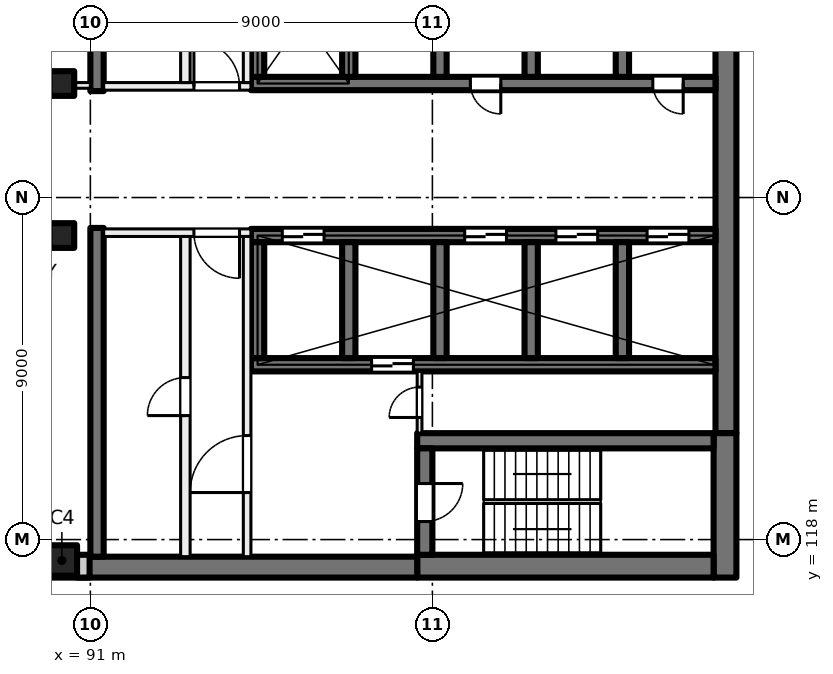
"""IFC4 building model, lengths in metres.
Left out: names, types, materials, properties, quantities, classifications, styles, units other than length and angle.
Written with IfcOpenShell. Run it as: python <this file> out.ifc"""

import sys

from ifc_helpers import new_model, si_unit, direction, frame, frame_2d, origin, origin_2d, place, context, subcontext, project, spatial, rectangle, extrude, element, fill, save


model = new_model("IFC4")
c1 = context("Model", 3, precision=1e-05, world=origin(), true_north=direction((0.0, 1.0)))
c2 = subcontext(c1, "Body", "Model", "MODEL_VIEW")
j1 = project(units=[si_unit("LENGTHUNIT", "METRE"), si_unit("PLANEANGLEUNIT", "RADIAN")], contexts=[c1])
p1 = place(None, origin())
s1 = spatial("IfcSite", under=j1, at=p1, CompositionType="ELEMENT")
p2 = place(p1, origin())
s2 = spatial("IfcBuilding", under=s1, at=p2, CompositionType="ELEMENT")
p3 = place(p2, frame((0.0, 0.0, 134.5)))
s3 = spatial("IfcBuildingStorey", under=s2, at=p3, CompositionType="ELEMENT", Elevation=134.5)
for number, where, z_axis, x_axis in (
    (1, (90.25, 130.0, 0.0), (0.0, 0.0, 1.0), (1.0, 0.0, 0.0)),
    (2, (90.25, 126.0, 0.0), (0.0, 0.0, 1.0), (1.0, 0.0, 0.0)),
):
    element("IfcColumn", number, at=place(p3, frame(where, z_axis=z_axis, x_axis=x_axis)), inside=s3, PredefinedType="COLUMN", context=c2, shape_type="SweptSolid", body=[
        extrude(rectangle(XDim=0.65, YDim=0.65, at=origin_2d()), origin(), (0.0, 0.0, 1.0), 4.0),
    ])
p4 = place(p3, frame((90.25, 117.45, 0.0), z_axis=(0.0, 0.0, 1.0), x_axis=(1.0, 0.0, 0.0)))
e3 = element("IfcColumn", 3, at=p4, inside=s3, PredefinedType="COLUMN", context=c2, shape_type="SweptSolid", body=[
    extrude(rectangle(XDim=0.8, YDim=0.8, at=origin_2d()), origin(), (0.0, 0.0, 1.0), 4.0),
])
p5 = place(p3, frame((107.725, 135.2, 0.0), z_axis=(0.0, 0.0, 1.0), x_axis=(0.0, -1.0, 0.0)))
e4 = element("IfcWall", 4, at=p5, inside=s3, PredefinedType="SHEAR", context=c2, shape_type="SweptSolid", body=[
    extrude(rectangle(XDim=14.4, YDim=0.55, at=frame_2d((7.2, 0.0))), origin(), (0.0, 0.0, 1.0), 4.0),
])
p6 = place(p3, frame((107.7, 120.8, 0.0), z_axis=(0.0, 0.0, 1.0), x_axis=(0.0, -1.0, 0.0)))
e5 = element("IfcWall", 5, at=p6, inside=s3, PredefinedType="SHEAR", context=c2, shape_type="SweptSolid", body=[
    extrude(rectangle(XDim=3.8, YDim=0.6, at=frame_2d((1.9, 0.0))), origin(), (0.0, 0.0, 1.0), 4.0),
])
p7 = place(p3, frame((107.4, 117.3, 0.0), z_axis=(0.0, 0.0, 1.0), x_axis=(-1.0, 0.0, 0.0)))
e6 = element("IfcWall", 6, at=p7, inside=s3, PredefinedType="SHEAR", context=c2, shape_type="SweptSolid", body=[
    extrude(rectangle(XDim=7.8, YDim=0.6, at=frame_2d((3.9, 0.0))), origin(), (0.0, 0.0, 1.0), 4.0),
])
p8 = place(p3, frame((99.6, 117.275, 0.0), z_axis=(0.0, 0.0, 1.0), x_axis=(-1.0, 0.0, 0.0)))
e7 = element("IfcWall", 7, at=p8, inside=s3, PredefinedType="SHEAR", context=c2, shape_type="SweptSolid", body=[
    extrude(rectangle(XDim=8.95, YDim=0.55, at=frame_2d((4.475, 0.0))), origin(), (0.0, 0.0, 1.0), 4.0),
])
p9 = place(p3, frame((107.4, 120.6, 0.0), z_axis=(0.0, 0.0, 1.0), x_axis=(-1.0, 0.0, 0.0)))
e8 = element("IfcWall", 8, at=p9, inside=s3, PredefinedType="SHEAR", context=c2, shape_type="SweptSolid", body=[
    extrude(rectangle(XDim=7.8, YDim=0.4, at=frame_2d((3.9, 0.0))), origin(), (0.0, 0.0, 1.0), 4.0),
])
p10 = place(p3, frame((99.8, 120.4, 0.0), z_axis=(0.0, 0.0, 1.0), x_axis=(0.0, -1.0, 0.0)))
e9 = element("IfcWall", 9, at=p10, inside=s3, PredefinedType="SHEAR", context=c2, shape_type="SweptSolid", body=[
    extrude(rectangle(XDim=2.8, YDim=0.4, at=frame_2d((1.4, 0.0))), origin(), (0.0, 0.0, 1.0), 4.0),
])
p11 = place(p10, frame((0.925, 0.0, 0.0)))
e10 = element("IfcOpeningElement", 10, at=p11, cuts=e9, PredefinedType="OPENING", context=c2, shape_type="SweptSolid", body=[
    extrude(rectangle(XDim=1.0, YDim=2.1, at=frame_2d((0.5, 1.05))), frame((0.0, 0.21, 0.0), z_axis=(0.0, -1.0, 0.0), x_axis=(1.0, 0.0, 0.0)), (0.0, 0.0, 1.0), 0.42),
])
p12 = place(p3, frame((107.45, 130.0, 0.0), z_axis=(0.0, 0.0, 1.0), x_axis=(-1.0, 0.0, 0.0)))
e11 = element("IfcWall", 11, at=p12, inside=s3, PredefinedType="SHEAR", context=c2, shape_type="SweptSolid", body=[
    extrude(rectangle(XDim=12.225, YDim=0.35, at=frame_2d((6.112, 0.0))), origin(), (0.0, 0.0, 1.0), 4.0),
])
p13 = place(p12, frame((0.85, 0.0, 0.0)))
e12 = element("IfcOpeningElement", 12, at=p13, cuts=e11, PredefinedType="OPENING", context=c2, shape_type="SweptSolid", body=[
    extrude(rectangle(XDim=0.8, YDim=2.1, at=frame_2d((0.4, 1.05))), frame((0.0, 0.185, 0.0), z_axis=(0.0, -1.0, 0.0), x_axis=(1.0, 0.0, 0.0)), (0.0, 0.0, 1.0), 0.37),
])
p14 = place(p12, frame((5.65, 0.0, 0.0)))
e13 = element("IfcOpeningElement", 13, at=p14, cuts=e11, PredefinedType="OPENING", context=c2, shape_type="SweptSolid", body=[
    extrude(rectangle(XDim=0.8, YDim=2.1, at=frame_2d((0.4, 1.05))), frame((0.0, 0.185, 0.0), z_axis=(0.0, -1.0, 0.0), x_axis=(1.0, 0.0, 0.0)), (0.0, 0.0, 1.0), 0.37),
])
for number, where, z_axis, x_axis in (
    (14, (105.0, 133.225, 0.0), (0.0, 0.0, 1.0), (0.0, -1.0, 0.0)),
    (15, (102.6, 133.225, 0.0), (0.0, 0.0, 1.0), (0.0, -1.0, 0.0)),
    (16, (100.2, 133.225, 0.0), (0.0, 0.0, 1.0), (0.0, -1.0, 0.0)),
    (17, (97.8, 133.225, 0.0), (0.0, 0.0, 1.0), (0.0, -1.0, 0.0)),
    (18, (95.4, 133.225, 0.0), (0.0, 0.0, 1.0), (0.0, -1.0, 0.0)),
):
    element("IfcWall", number, at=place(p3, frame(where, z_axis=z_axis, x_axis=x_axis)), inside=s3, PredefinedType="SHEAR", context=c2, shape_type="SweptSolid", body=[
        extrude(rectangle(XDim=3.05, YDim=0.35, at=frame_2d((1.525, 0.0))), origin(), (0.0, 0.0, 1.0), 4.0),
    ])
p15 = place(p3, frame((107.45, 126.0, 0.0), z_axis=(0.0, 0.0, 1.0), x_axis=(-1.0, 0.0, 0.0)))
e19 = element("IfcWall", 19, at=p15, inside=s3, PredefinedType="SHEAR", context=c2, shape_type="SweptSolid", body=[
    extrude(rectangle(XDim=12.225, YDim=0.35, at=frame_2d((6.112, 0.0))), origin(), (0.0, 0.0, 1.0), 4.0),
])
p16 = place(p15, frame((0.7, 0.0, 0.0)))
e20 = element("IfcOpeningElement", 20, at=p16, cuts=e19, PredefinedType="OPENING", context=c2, shape_type="SweptSolid", body=[
    extrude(rectangle(XDim=1.1, YDim=2.1, at=frame_2d((0.55, 1.05))), frame((0.0, 0.185, 0.0), z_axis=(0.0, -1.0, 0.0), x_axis=(1.0, 0.0, 0.0)), (0.0, 0.0, 1.0), 0.37),
])
p17 = place(p15, frame((3.1, 0.0, 0.0)))
e21 = element("IfcOpeningElement", 21, at=p17, cuts=e19, PredefinedType="OPENING", context=c2, shape_type="SweptSolid", body=[
    extrude(rectangle(XDim=1.1, YDim=2.1, at=frame_2d((0.55, 1.05))), frame((0.0, 0.185, 0.0), z_axis=(0.0, -1.0, 0.0), x_axis=(1.0, 0.0, 0.0)), (0.0, 0.0, 1.0), 0.37),
])
p18 = place(p15, frame((5.5, 0.0, 0.0)))
e22 = element("IfcOpeningElement", 22, at=p18, cuts=e19, PredefinedType="OPENING", context=c2, shape_type="SweptSolid", body=[
    extrude(rectangle(XDim=1.1, YDim=2.1, at=frame_2d((0.55, 1.05))), frame((0.0, 0.185, 0.0), z_axis=(0.0, -1.0, 0.0), x_axis=(1.0, 0.0, 0.0)), (0.0, 0.0, 1.0), 0.37),
])
p19 = place(p15, frame((10.3, 0.0, 0.0)))
e23 = element("IfcOpeningElement", 23, at=p19, cuts=e19, PredefinedType="OPENING", context=c2, shape_type="SweptSolid", body=[
    extrude(rectangle(XDim=1.1, YDim=2.1, at=frame_2d((0.55, 1.05))), frame((0.0, 0.185, 0.0), z_axis=(0.0, -1.0, 0.0), x_axis=(1.0, 0.0, 0.0)), (0.0, 0.0, 1.0), 0.37),
])
p20 = place(p3, frame((107.45, 122.6, 0.0), z_axis=(0.0, 0.0, 1.0), x_axis=(-1.0, 0.0, 0.0)))
e24 = element("IfcWall", 24, at=p20, inside=s3, PredefinedType="SHEAR", context=c2, shape_type="SweptSolid", body=[
    extrude(rectangle(XDim=12.225, YDim=0.35, at=frame_2d((6.112, 0.0))), origin(), (0.0, 0.0, 1.0), 4.0),
])
p21 = place(p20, frame((7.95, 0.0, 0.0)))
e25 = element("IfcOpeningElement", 25, at=p21, cuts=e24, PredefinedType="OPENING", context=c2, shape_type="SweptSolid", body=[
    extrude(rectangle(XDim=1.1, YDim=2.1, at=frame_2d((0.55, 1.05))), frame((0.0, 0.185, 0.0), z_axis=(0.0, -1.0, 0.0), x_axis=(1.0, 0.0, 0.0)), (0.0, 0.0, 1.0), 0.37),
])
for number, where, z_axis, x_axis in (
    (26, (105.0, 125.825, 0.0), (0.0, 0.0, 1.0), (0.0, -1.0, 0.0)),
    (27, (102.6, 125.825, 0.0), (0.0, 0.0, 1.0), (0.0, -1.0, 0.0)),
    (28, (100.2, 125.825, 0.0), (0.0, 0.0, 1.0), (0.0, -1.0, 0.0)),
    (29, (97.8, 125.825, 0.0), (0.0, 0.0, 1.0), (0.0, -1.0, 0.0)),
    (30, (95.4, 125.825, 0.0), (0.0, 0.0, 1.0), (0.0, -1.0, 0.0)),
):
    element("IfcWall", number, at=place(p3, frame(where, z_axis=z_axis, x_axis=x_axis)), inside=s3, PredefinedType="SHEAR", context=c2, shape_type="SweptSolid", body=[
        extrude(rectangle(XDim=3.05, YDim=0.35, at=frame_2d((1.525, 0.0))), origin(), (0.0, 0.0, 1.0), 4.0),
    ])
for number, where, z_axis, x_axis in (
    (31, (91.175, 138.45, 0.0), (0.0, 0.0, 1.0), (0.0, -1.0, 0.0)),
    (32, (91.175, 126.2, 0.0), (0.0, 0.0, 1.0), (0.0, -1.0, 0.0)),
):
    element("IfcWall", number, at=place(p3, frame(where, z_axis=z_axis, x_axis=x_axis)), inside=s3, PredefinedType="SHEAR", context=c2, shape_type="SweptSolid", body=[
        extrude(rectangle(XDim=8.65, YDim=0.35, at=frame_2d((4.325, 0.0))), origin(), (0.0, 0.0, 1.0), 4.0),
    ])
p22 = place(p3, frame((90.98, 117.3, 0.0), z_axis=(0.0, 0.0, 1.0), x_axis=(-1.0, 0.0, 0.0)))
e33 = element("IfcWall", 33, at=p22, inside=s3, PredefinedType="SOLIDWALL", context=c2, shape_type="SweptSolid", body=[
    extrude(rectangle(XDim=33.745, YDim=0.6, at=frame_2d((16.873, 0.0))), origin(), (0.0, 0.0, 1.0), 3.625),
])
p23 = place(p22, frame((1.48, 0.0, 0.9)))
e34 = element("IfcOpeningElement", 34, at=p23, cuts=e33, PredefinedType="OPENING", context=c2, shape_type="SweptSolid", body=[
    extrude(rectangle(XDim=3.0, YDim=2.4, at=frame_2d((1.5, 1.2))), frame((0.0, 0.31, 0.0), z_axis=(0.0, -1.0, 0.0), x_axis=(1.0, 0.0, 0.0)), (0.0, 0.0, 1.0), 0.62),
])
p24 = place(p22, frame((5.98, 0.0, 0.9)))
e35 = element("IfcOpeningElement", 35, at=p24, cuts=e33, PredefinedType="OPENING", context=c2, shape_type="SweptSolid", body=[
    extrude(rectangle(XDim=3.0, YDim=2.4, at=frame_2d((1.5, 1.2))), frame((0.0, 0.31, 0.0), z_axis=(0.0, -1.0, 0.0), x_axis=(1.0, 0.0, 0.0)), (0.0, 0.0, 1.0), 0.62),
])
p25 = place(p22, frame((10.48, 0.0, 0.9)))
e36 = element("IfcOpeningElement", 36, at=p25, cuts=e33, PredefinedType="OPENING", context=c2, shape_type="SweptSolid", body=[
    extrude(rectangle(XDim=3.0, YDim=2.4, at=frame_2d((1.5, 1.2))), frame((0.0, 0.31, 0.0), z_axis=(0.0, -1.0, 0.0), x_axis=(1.0, 0.0, 0.0)), (0.0, 0.0, 1.0), 0.62),
])
p26 = place(p22, frame((14.98, 0.0, 0.9)))
e37 = element("IfcOpeningElement", 37, at=p26, cuts=e33, PredefinedType="OPENING", context=c2, shape_type="SweptSolid", body=[
    extrude(rectangle(XDim=3.0, YDim=2.4, at=frame_2d((1.5, 1.2))), frame((0.0, 0.31, 0.0), z_axis=(0.0, -1.0, 0.0), x_axis=(1.0, 0.0, 0.0)), (0.0, 0.0, 1.0), 0.62),
])
p27 = place(p22, frame((19.48, 0.0, 0.9)))
e38 = element("IfcOpeningElement", 38, at=p27, cuts=e33, PredefinedType="OPENING", context=c2, shape_type="SweptSolid", body=[
    extrude(rectangle(XDim=3.0, YDim=2.4, at=frame_2d((1.5, 1.2))), frame((0.0, 0.31, 0.0), z_axis=(0.0, -1.0, 0.0), x_axis=(1.0, 0.0, 0.0)), (0.0, 0.0, 1.0), 0.62),
])
p28 = place(p22, frame((23.98, 0.0, 0.9)))
e39 = element("IfcOpeningElement", 39, at=p28, cuts=e33, PredefinedType="OPENING", context=c2, shape_type="SweptSolid", body=[
    extrude(rectangle(XDim=3.0, YDim=2.4, at=frame_2d((1.5, 1.2))), frame((0.0, 0.31, 0.0), z_axis=(0.0, -1.0, 0.0), x_axis=(1.0, 0.0, 0.0)), (0.0, 0.0, 1.0), 0.62),
])
p29 = place(p22, frame((28.48, 0.0, 0.9)))
e40 = element("IfcOpeningElement", 40, at=p29, cuts=e33, PredefinedType="OPENING", context=c2, shape_type="SweptSolid", body=[
    extrude(rectangle(XDim=3.0, YDim=2.4, at=frame_2d((1.5, 1.2))), frame((0.0, 0.31, 0.0), z_axis=(0.0, -1.0, 0.0), x_axis=(1.0, 0.0, 0.0)), (0.0, 0.0, 1.0), 0.62),
])
p30 = place(p3, frame((95.225, 126.075, 0.0), z_axis=(0.0, 0.0, 1.0), x_axis=(-1.0, 0.0, 0.0)))
e41 = element("IfcWall", 41, at=p30, inside=s3, PredefinedType="PARTITIONING", context=c2, shape_type="SweptSolid", body=[
    extrude(rectangle(XDim=3.875, YDim=0.2, at=frame_2d((1.938, 0.0))), origin(), (0.0, 0.0, 1.0), 3.625),
])
p31 = place(p30, frame((0.3, 0.0, 0.0)))
e42 = element("IfcOpeningElement", 42, at=p31, cuts=e41, PredefinedType="OPENING", context=c2, shape_type="SweptSolid", body=[
    extrude(rectangle(XDim=1.2, YDim=2.1, at=frame_2d((0.6, 1.05))), frame((0.0, 0.11, 0.0), z_axis=(0.0, -1.0, 0.0), x_axis=(1.0, 0.0, 0.0)), (0.0, 0.0, 1.0), 0.22),
])
p32 = place(p3, frame((95.125, 117.55, 0.0), z_axis=(0.0, 0.0, 1.0), x_axis=(0.0, 1.0, 0.0)))
e43 = element("IfcWall", 43, at=p32, inside=s3, PredefinedType="PARTITIONING", context=c2, shape_type="SweptSolid", body=[
    extrude(rectangle(XDim=8.425, YDim=0.2, at=frame_2d((4.212, 0.0))), origin(), (0.0, 0.0, 1.0), 3.625),
])
p33 = place(p32, frame((1.688, 0.0, 0.0)))
e44 = element("IfcOpeningElement", 44, at=p33, cuts=e43, PredefinedType="OPENING", context=c2, shape_type="SweptSolid", body=[
    extrude(rectangle(XDim=1.5, YDim=2.1, at=frame_2d((0.75, 1.05))), frame((0.0, 0.11, 0.0), z_axis=(0.0, -1.0, 0.0), x_axis=(1.0, 0.0, 0.0)), (0.0, 0.0, 1.0), 0.22),
])
p34 = place(p3, frame((93.5, 117.55, 0.0), z_axis=(0.0, 0.0, 1.0), x_axis=(0.0, 1.0, 0.0)))
e45 = element("IfcWall", 45, at=p34, inside=s3, PredefinedType="PARTITIONING", context=c2, shape_type="SweptSolid", body=[
    extrude(rectangle(XDim=8.425, YDim=0.25, at=frame_2d((4.212, 0.0))), origin(), (0.0, 0.0, 1.0), 3.625),
])
p35 = place(p34, frame((3.712, 0.0, 0.0)))
e46 = element("IfcOpeningElement", 46, at=p35, cuts=e45, PredefinedType="OPENING", context=c2, shape_type="SweptSolid", body=[
    extrude(rectangle(XDim=1.0, YDim=2.1, at=frame_2d((0.5, 1.05))), frame((0.0, 0.135, 0.0), z_axis=(0.0, -1.0, 0.0), x_axis=(1.0, 0.0, 0.0)), (0.0, 0.0, 1.0), 0.27),
])
p36 = place(p3, frame((99.663, 120.8, 0.0), z_axis=(0.0, 0.0, 1.0), x_axis=(0.0, 1.0, 0.0)))
e47 = element("IfcWall", 47, at=p36, inside=s3, PredefinedType="PARTITIONING", context=c2, shape_type="SweptSolid", body=[
    extrude(rectangle(XDim=1.625, YDim=0.125, at=frame_2d((0.812, 0.0))), origin(), (0.0, 0.0, 1.0), 3.625),
])
p37 = place(p36, frame((0.413, 0.0, 0.0)))
e48 = element("IfcOpeningElement", 48, at=p37, cuts=e47, PredefinedType="OPENING", context=c2, shape_type="SweptSolid", body=[
    extrude(rectangle(XDim=0.8, YDim=2.1, at=frame_2d((0.4, 1.05))), frame((0.0, 0.073, 0.0), z_axis=(0.0, -1.0, 0.0), x_axis=(1.0, 0.0, 0.0)), (0.0, 0.0, 1.0), 0.145),
])
p38 = place(p3, frame((91.35, 129.925, 0.0), z_axis=(0.0, 0.0, 1.0), x_axis=(1.0, 0.0, 0.0)))
e49 = element("IfcWall", 49, at=p38, inside=s3, PredefinedType="PARTITIONING", context=c2, shape_type="SweptSolid", body=[
    extrude(rectangle(XDim=3.875, YDim=0.2, at=frame_2d((1.938, 0.0))), origin(), (0.0, 0.0, 1.0), 3.625),
])
p39 = place(p38, frame((2.375, 0.0, 0.0)))
e50 = element("IfcOpeningElement", 50, at=p39, cuts=e49, PredefinedType="OPENING", context=c2, shape_type="SweptSolid", body=[
    extrude(rectangle(XDim=1.2, YDim=2.1, at=frame_2d((0.6, 1.05))), frame((0.0, 0.11, 0.0), z_axis=(0.0, -1.0, 0.0), x_axis=(1.0, 0.0, 0.0)), (0.0, 0.0, 1.0), 0.22),
])
p40 = place(p3, frame((95.125, 130.025, 0.0), z_axis=(0.0, 0.0, 1.0), x_axis=(0.0, 1.0, 0.0)))
e51 = element("IfcWall", 51, at=p40, inside=s3, PredefinedType="PARTITIONING", context=c2, shape_type="SweptSolid", body=[
    extrude(rectangle(XDim=8.425, YDim=0.2, at=frame_2d((4.212, 0.0))), origin(), (0.0, 0.0, 1.0), 3.625),
])
p41 = place(p40, frame((5.238, 0.0, 0.0)))
e52 = element("IfcOpeningElement", 52, at=p41, cuts=e51, PredefinedType="OPENING", context=c2, shape_type="SweptSolid", body=[
    extrude(rectangle(XDim=1.5, YDim=2.1, at=frame_2d((0.75, 1.05))), frame((0.0, 0.11, 0.0), z_axis=(0.0, -1.0, 0.0), x_axis=(1.0, 0.0, 0.0)), (0.0, 0.0, 1.0), 0.22),
])
p42 = place(p3, frame((93.5, 130.025, 0.0), z_axis=(0.0, 0.0, 1.0), x_axis=(0.0, 1.0, 0.0)))
e53 = element("IfcWall", 53, at=p42, inside=s3, PredefinedType="PARTITIONING", context=c2, shape_type="SweptSolid", body=[
    extrude(rectangle(XDim=8.425, YDim=0.25, at=frame_2d((4.212, 0.0))), origin(), (0.0, 0.0, 1.0), 3.625),
])
p43 = place(p42, frame((1.683, 0.0, 0.0)))
e54 = element("IfcOpeningElement", 54, at=p43, cuts=e53, PredefinedType="OPENING", context=c2, shape_type="SweptSolid", body=[
    extrude(rectangle(XDim=0.8, YDim=2.1, at=frame_2d((0.4, 1.05))), frame((0.0, 0.135, 0.0), z_axis=(0.0, -1.0, 0.0), x_axis=(1.0, 0.0, 0.0)), (0.0, 0.0, 1.0), 0.27),
])
p44 = place(p42, frame((5.845, 0.0, 0.0)))
e55 = element("IfcOpeningElement", 55, at=p44, cuts=e53, PredefinedType="OPENING", context=c2, shape_type="SweptSolid", body=[
    extrude(rectangle(XDim=1.0, YDim=2.1, at=frame_2d((0.5, 1.05))), frame((0.0, 0.135, 0.0), z_axis=(0.0, -1.0, 0.0), x_axis=(1.0, 0.0, 0.0)), (0.0, 0.0, 1.0), 0.27),
])
p45 = place(p3, frame((85.825, 129.95, 0.0), z_axis=(0.0, 0.0, 1.0), x_axis=(1.0, 0.0, 0.0)))
e56 = element("IfcWall", 56, at=p45, inside=s3, PredefinedType="PARTITIONING", context=c2, shape_type="SweptSolid", body=[
    extrude(rectangle(XDim=5.175, YDim=0.15, at=frame_2d((2.587, 0.0))), origin(), (0.0, 0.0, 1.0), 3.625),
])
p46 = place(p45, frame((2.077, 0.0, 0.0)))
e57 = element("IfcOpeningElement", 57, at=p46, cuts=e56, PredefinedType="OPENING", context=c2, shape_type="SweptSolid", body=[
    extrude(rectangle(XDim=1.0, YDim=2.1, at=frame_2d((0.5, 1.05))), frame((0.0, 0.085, 0.0), z_axis=(0.0, -1.0, 0.0), x_axis=(1.0, 0.0, 0.0)), (0.0, 0.0, 1.0), 0.17),
])
p47 = place(p16, origin())
e58 = element("IfcDoor", 58, at=p47, inside=s3, OperationType="DOUBLE_DOOR_SLIDING", PredefinedType="DOOR", context=c2, shape_type="SweptSolid", body=[
    extrude(rectangle(XDim=1.1, YDim=2.1, at=frame_2d((0.55, 1.05))), frame((0.0, 0.025, 0.0), z_axis=(0.0, -1.0, 0.0), x_axis=(1.0, 0.0, 0.0)), (0.0, 0.0, 1.0), 0.05),
])
fill(e20, e58)
p48 = place(p17, origin())
e59 = element("IfcDoor", 59, at=p48, inside=s3, OperationType="DOUBLE_DOOR_SLIDING", PredefinedType="DOOR", context=c2, shape_type="SweptSolid", body=[
    extrude(rectangle(XDim=1.1, YDim=2.1, at=frame_2d((0.55, 1.05))), frame((0.0, 0.025, 0.0), z_axis=(0.0, -1.0, 0.0), x_axis=(1.0, 0.0, 0.0)), (0.0, 0.0, 1.0), 0.05),
])
fill(e21, e59)
p49 = place(p18, origin())
e60 = element("IfcDoor", 60, at=p49, inside=s3, OperationType="DOUBLE_DOOR_SLIDING", PredefinedType="DOOR", context=c2, shape_type="SweptSolid", body=[
    extrude(rectangle(XDim=1.1, YDim=2.1, at=frame_2d((0.55, 1.05))), frame((0.0, 0.025, 0.0), z_axis=(0.0, -1.0, 0.0), x_axis=(1.0, 0.0, 0.0)), (0.0, 0.0, 1.0), 0.05),
])
fill(e22, e60)
p50 = place(p19, origin())
e61 = element("IfcDoor", 61, at=p50, inside=s3, OperationType="DOUBLE_DOOR_SLIDING", PredefinedType="DOOR", context=c2, shape_type="SweptSolid", body=[
    extrude(rectangle(XDim=1.1, YDim=2.1, at=frame_2d((0.55, 1.05))), frame((0.0, 0.025, 0.0), z_axis=(0.0, -1.0, 0.0), x_axis=(1.0, 0.0, 0.0)), (0.0, 0.0, 1.0), 0.05),
])
fill(e23, e61)
p51 = place(p13, origin())
e62 = element("IfcDoor", 62, at=p51, inside=s3, OperationType="SINGLE_SWING_LEFT", PredefinedType="DOOR", context=c2, shape_type="SweptSolid", body=[
    extrude(rectangle(XDim=0.8, YDim=2.1, at=frame_2d((0.4, 1.05))), frame((0.0, 0.025, 0.0), z_axis=(0.0, -1.0, 0.0), x_axis=(1.0, 0.0, 0.0)), (0.0, 0.0, 1.0), 0.05),
])
fill(e12, e62)
p52 = place(p14, origin())
e63 = element("IfcDoor", 63, at=p52, inside=s3, OperationType="SINGLE_SWING_RIGHT", PredefinedType="DOOR", context=c2, shape_type="SweptSolid", body=[
    extrude(rectangle(XDim=0.8, YDim=2.1, at=frame_2d((0.4, 1.05))), frame((0.0, 0.025, 0.0), z_axis=(0.0, -1.0, 0.0), x_axis=(1.0, 0.0, 0.0)), (0.0, 0.0, 1.0), 0.05),
])
fill(e13, e63)
p53 = place(p31, origin())
e64 = element("IfcDoor", 64, at=p53, inside=s3, OperationType="DOUBLE_DOOR_SINGLE_SWING", PredefinedType="DOOR", context=c2, shape_type="SweptSolid", body=[
    extrude(rectangle(XDim=1.2, YDim=2.1, at=frame_2d((0.6, 1.05))), frame((0.0, 0.025, 0.0), z_axis=(0.0, -1.0, 0.0), x_axis=(1.0, 0.0, 0.0)), (0.0, 0.0, 1.0), 0.05),
])
fill(e42, e64)
p54 = place(p33, origin())
e65 = element("IfcDoor", 65, at=p54, inside=s3, OperationType="DOUBLE_DOOR_SINGLE_SWING", PredefinedType="DOOR", context=c2, shape_type="SweptSolid", body=[
    extrude(rectangle(XDim=1.5, YDim=2.1, at=frame_2d((0.75, 1.05))), frame((0.0, 0.025, 0.0), z_axis=(0.0, -1.0, 0.0), x_axis=(1.0, 0.0, 0.0)), (0.0, 0.0, 1.0), 0.05),
])
fill(e44, e65)
p55 = place(p11, origin())
e66 = element("IfcDoor", 66, at=p55, inside=s3, OperationType="SINGLE_SWING_LEFT", PredefinedType="DOOR", context=c2, shape_type="SweptSolid", body=[
    extrude(rectangle(XDim=1.0, YDim=2.1, at=frame_2d((0.5, 1.05))), frame((0.0, 0.025, 0.0), z_axis=(0.0, -1.0, 0.0), x_axis=(1.0, 0.0, 0.0)), (0.0, 0.0, 1.0), 0.05),
])
fill(e10, e66)
p56 = place(p37, origin())
e67 = element("IfcDoor", 67, at=p56, inside=s3, OperationType="SINGLE_SWING_RIGHT", PredefinedType="DOOR", context=c2, shape_type="SweptSolid", body=[
    extrude(rectangle(XDim=0.8, YDim=2.1, at=frame_2d((0.4, 1.05))), frame((0.0, 0.025, 0.0), z_axis=(0.0, -1.0, 0.0), x_axis=(1.0, 0.0, 0.0)), (0.0, 0.0, 1.0), 0.05),
])
fill(e48, e67)
p57 = place(p35, origin())
e68 = element("IfcDoor", 68, at=p57, inside=s3, OperationType="SINGLE_SWING_LEFT", PredefinedType="DOOR", context=c2, shape_type="SweptSolid", body=[
    extrude(rectangle(XDim=1.0, YDim=2.1, at=frame_2d((0.5, 1.05))), frame((0.0, 0.025, 0.0), z_axis=(0.0, -1.0, 0.0), x_axis=(1.0, 0.0, 0.0)), (0.0, 0.0, 1.0), 0.05),
])
fill(e46, e68)
p58 = place(p39, origin())
e69 = element("IfcDoor", 69, at=p58, inside=s3, OperationType="DOUBLE_DOOR_SINGLE_SWING", PredefinedType="DOOR", context=c2, shape_type="SweptSolid", body=[
    extrude(rectangle(XDim=1.2, YDim=2.1, at=frame_2d((0.6, 1.05))), frame((0.0, 0.025, 0.0), z_axis=(0.0, -1.0, 0.0), x_axis=(1.0, 0.0, 0.0)), (0.0, 0.0, 1.0), 0.05),
])
fill(e50, e69)
p59 = place(p21, origin())
e70 = element("IfcDoor", 70, at=p59, inside=s3, OperationType="DOUBLE_DOOR_SLIDING", PredefinedType="DOOR", context=c2, shape_type="SweptSolid", body=[
    extrude(rectangle(XDim=1.1, YDim=2.1, at=frame_2d((0.55, 1.05))), frame((0.0, 0.025, 0.0), z_axis=(0.0, -1.0, 0.0), x_axis=(1.0, 0.0, 0.0)), (0.0, 0.0, 1.0), 0.05),
])
fill(e25, e70)
save(model, sys.argv[1])
